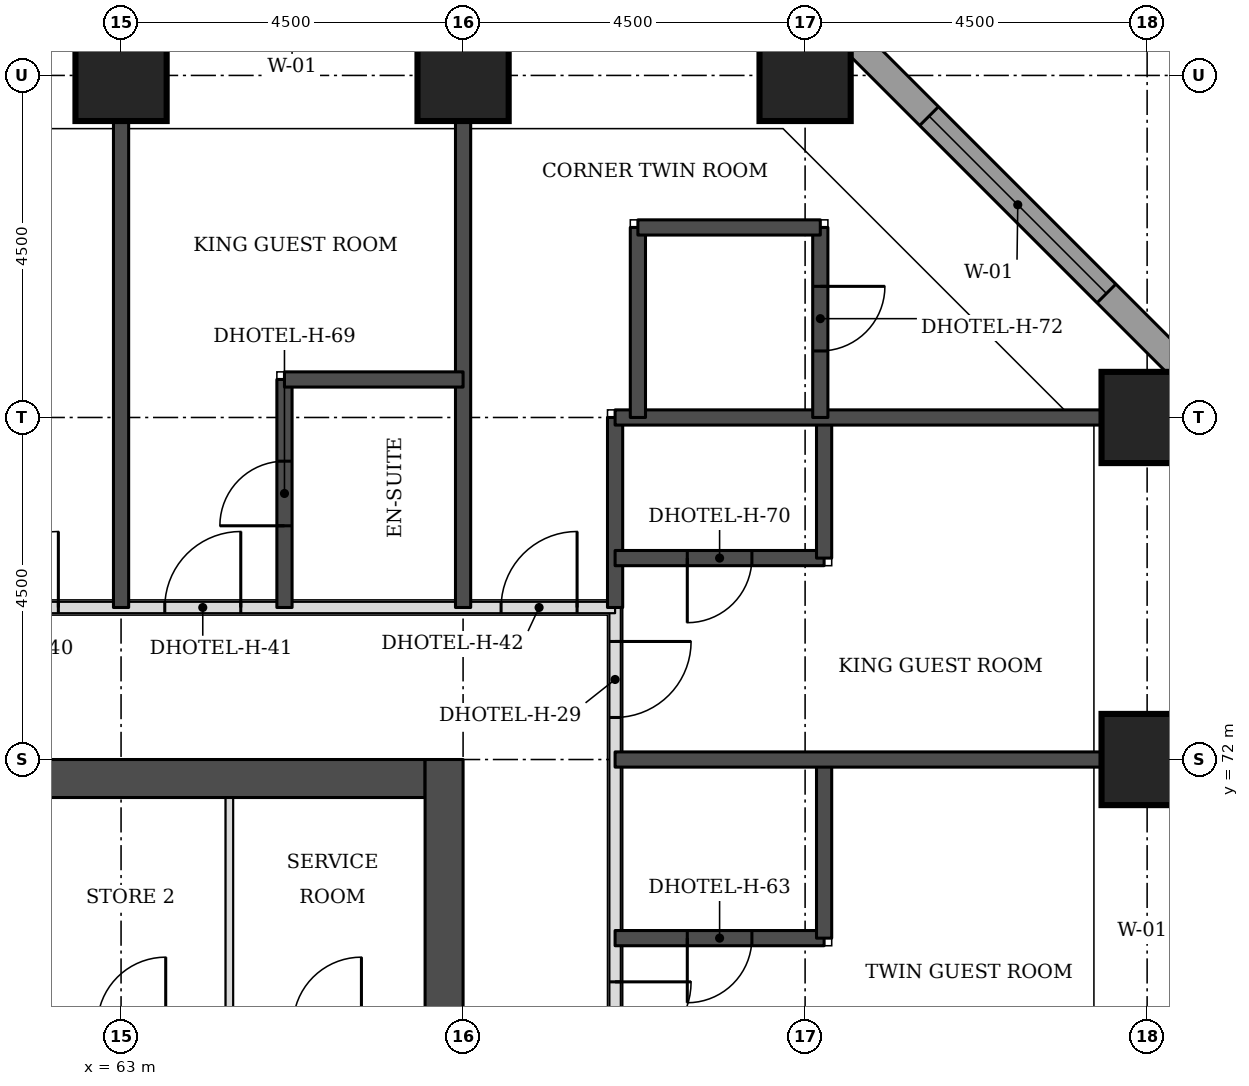
"""IFC4 building model, lengths in metres.
Left out: names, types, materials, properties, quantities, classifications, styles, units other than length and angle.
Written with IfcOpenShell. Run it as: python <this file> out.ifc"""

import sys

from ifc_helpers import new_model, si_unit, direction, frame, frame_2d, origin, origin_2d, place, context, subcontext, project, spatial, rectangle, extrude, element, fill, save


model = new_model("IFC4")
c1 = context("Model", 3, precision=1e-05, world=origin(), true_north=direction((0.0, 1.0)))
c2 = subcontext(c1, "Body", "Model", "MODEL_VIEW")
j1 = project(units=[si_unit("LENGTHUNIT", "METRE"), si_unit("PLANEANGLEUNIT", "RADIAN")], contexts=[c1])
p1 = place(None, origin())
s1 = spatial("IfcSite", under=j1, at=p1, CompositionType="ELEMENT")
p2 = place(p1, origin())
s2 = spatial("IfcBuilding", under=s1, at=p2, CompositionType="ELEMENT")
p3 = place(p2, frame((0.0, 0.0, 46.2)))
s3 = spatial("IfcBuildingStorey", under=s2, at=p3, CompositionType="ELEMENT", Elevation=46.2)
for number, where, z_axis, x_axis in (
    (1, (76.5, 72.0, 0.0), (0.0, 0.0, 1.0), (1.0, 0.0, 0.0)),
    (2, (76.5, 76.5, 0.0), (0.0, 0.0, 1.0), (1.0, 0.0, 0.0)),
    (3, (63.0, 81.0, 0.0), (0.0, 0.0, 1.0), (1.0, 0.0, 0.0)),
    (4, (67.5, 81.0, 0.0), (0.0, 0.0, 1.0), (1.0, 0.0, 0.0)),
    (5, (72.0, 81.0, 0.0), (0.0, 0.0, 1.0), (1.0, 0.0, 0.0)),
):
    element("IfcColumn", number, at=place(p3, frame(where, z_axis=z_axis, x_axis=x_axis)), inside=s3, PredefinedType="COLUMN", context=c2, shape_type="SweptSolid", body=[
        extrude(rectangle(XDim=1.2, YDim=1.2, at=origin_2d()), origin(), (0.0, 0.0, 1.0), 3.3),
    ])
p4 = place(p3, frame((45.5, 71.75, 0.0), z_axis=(0.0, 0.0, 1.0), x_axis=(1.0, 0.0, 0.0)))
e6 = element("IfcWall", 6, at=p4, inside=s3, PredefinedType="SHEAR", context=c2, shape_type="SweptSolid", body=[
    extrude(rectangle(XDim=21.5, YDim=0.5, at=frame_2d((10.75, 0.0))), origin(), (0.0, 0.0, 1.0), 3.3),
])
p5 = place(p3, frame((67.25, 49.5, 0.0), z_axis=(0.0, 0.0, 1.0), x_axis=(0.0, 1.0, 0.0)))
e7 = element("IfcWall", 7, at=p5, inside=s3, PredefinedType="SHEAR", context=c2, shape_type="SweptSolid", body=[
    extrude(rectangle(XDim=22.5, YDim=0.5, at=frame_2d((11.25, 0.0))), origin(), (0.0, 0.0, 1.0), 3.3),
])
p6 = place(p5, frame((4.2, 0.0, 0.0)))
e8 = element("IfcOpeningElement", 8, at=p6, cuts=e7, PredefinedType="OPENING", context=c2, shape_type="SweptSolid", body=[
    extrude(rectangle(XDim=1.8, YDim=2.1, at=frame_2d((0.9, 1.05))), frame((0.0, 0.26, 0.0), z_axis=(0.0, -1.0, 0.0), x_axis=(1.0, 0.0, 0.0)), (0.0, 0.0, 1.0), 0.52),
])
p7 = place(p5, frame((6.9, 0.0, 0.0)))
e9 = element("IfcOpeningElement", 9, at=p7, cuts=e7, PredefinedType="OPENING", context=c2, shape_type="SweptSolid", body=[
    extrude(rectangle(XDim=1.1, YDim=2.1, at=frame_2d((0.55, 1.05))), frame((0.0, 0.26, 0.0), z_axis=(0.0, -1.0, 0.0), x_axis=(1.0, 0.0, 0.0)), (0.0, 0.0, 1.0), 0.52),
])
p8 = place(p5, frame((13.6, 0.0, 0.0)))
e10 = element("IfcOpeningElement", 10, at=p8, cuts=e7, PredefinedType="OPENING", context=c2, shape_type="SweptSolid", body=[
    extrude(rectangle(XDim=1.1, YDim=2.1, at=frame_2d((0.55, 1.05))), frame((0.0, 0.26, 0.0), z_axis=(0.0, -1.0, 0.0), x_axis=(1.0, 0.0, 0.0)), (0.0, 0.0, 1.0), 0.52),
])
p9 = place(p5, frame((16.5, 0.0, 0.0)))
e11 = element("IfcOpeningElement", 11, at=p9, cuts=e7, PredefinedType="OPENING", context=c2, shape_type="SweptSolid", body=[
    extrude(rectangle(XDim=1.8, YDim=2.1, at=frame_2d((0.9, 1.05))), frame((0.0, 0.26, 0.0), z_axis=(0.0, -1.0, 0.0), x_axis=(1.0, 0.0, 0.0)), (0.0, 0.0, 1.0), 0.52),
])
p10 = place(p3, frame((77.326, 76.77, 0.0), z_axis=(0.0, 0.0, 1.0), x_axis=(-0.707106781187, 0.707106781187, 0.0)))
e12 = element("IfcWall", 12, at=p10, inside=s3, PredefinedType="STANDARD", context=c2, shape_type="SweptSolid", body=[
    extrude(rectangle(XDim=7.151, YDim=0.35, at=frame_2d((3.576, 0.0))), origin(), (0.0, 0.0, 1.0), 3.055),
])
p11 = place(p10, frame((1.926, 0.0, 0.8)))
e13 = element("IfcOpeningElement", 13, at=p11, cuts=e12, PredefinedType="OPENING", context=c2, shape_type="SweptSolid", body=[
    extrude(rectangle(XDim=3.3, YDim=1.5, at=frame_2d((1.65, 0.75))), frame((0.0, 0.185, 0.0), z_axis=(0.0, -1.0, 0.0), x_axis=(1.0, 0.0, 0.0)), (0.0, 0.0, 1.0), 0.37),
])
p12 = place(p3, frame((69.5, 47.5, 0.0), z_axis=(0.0, 0.0, 1.0), x_axis=(0.0, 1.0, 0.0)))
e14 = element("IfcWall", 14, at=p12, inside=s3, PredefinedType="PARTITIONING", context=c2, shape_type="SweptSolid", body=[
    extrude(rectangle(XDim=26.5, YDim=0.15, at=frame_2d((13.25, 0.0))), origin(), (0.0, 0.0, 1.0), 3.08),
])
p13 = place(p12, frame((25.053, 0.0, 0.0)))
e15 = element("IfcOpeningElement", 15, at=p13, cuts=e14, PredefinedType="OPENING", context=c2, shape_type="SweptSolid", body=[
    extrude(rectangle(XDim=1.0, YDim=2.1, at=frame_2d((0.5, 1.05))), frame((0.0, 0.085, 0.0), z_axis=(0.0, -1.0, 0.0), x_axis=(1.0, 0.0, 0.0)), (0.0, 0.0, 1.0), 0.17),
])
p14 = place(p12, frame((20.575, 0.0, 0.0)))
e16 = element("IfcOpeningElement", 16, at=p14, cuts=e14, PredefinedType="OPENING", context=c2, shape_type="SweptSolid", body=[
    extrude(rectangle(XDim=1.0, YDim=2.1, at=frame_2d((0.5, 1.05))), frame((0.0, 0.085, 0.0), z_axis=(0.0, -1.0, 0.0), x_axis=(1.0, 0.0, 0.0)), (0.0, 0.0, 1.0), 0.17),
])
p15 = place(p12, frame((18.175, 0.0, 0.0)))
e17 = element("IfcOpeningElement", 17, at=p15, cuts=e14, PredefinedType="OPENING", context=c2, shape_type="SweptSolid", body=[
    extrude(rectangle(XDim=1.0, YDim=2.1, at=frame_2d((0.5, 1.05))), frame((0.0, 0.085, 0.0), z_axis=(0.0, -1.0, 0.0), x_axis=(1.0, 0.0, 0.0)), (0.0, 0.0, 1.0), 0.17),
])
p16 = place(p12, frame((11.575, 0.0, 0.0)))
e18 = element("IfcOpeningElement", 18, at=p16, cuts=e14, PredefinedType="OPENING", context=c2, shape_type="SweptSolid", body=[
    extrude(rectangle(XDim=1.0, YDim=2.1, at=frame_2d((0.5, 1.05))), frame((0.0, 0.085, 0.0), z_axis=(0.0, -1.0, 0.0), x_axis=(1.0, 0.0, 0.0)), (0.0, 0.0, 1.0), 0.17),
])
p17 = place(p12, frame((7.65, 0.0, 0.0)))
e19 = element("IfcOpeningElement", 19, at=p17, cuts=e14, PredefinedType="OPENING", context=c2, shape_type="SweptSolid", body=[
    extrude(rectangle(XDim=1.1, YDim=2.1, at=frame_2d((0.55, 1.05))), frame((0.0, 0.085, 0.0), z_axis=(0.0, -1.0, 0.0), x_axis=(1.0, 0.0, 0.0)), (0.0, 0.0, 1.0), 0.17),
])
p18 = place(p12, frame((0.447, 0.0, 0.0)))
e20 = element("IfcOpeningElement", 20, at=p18, cuts=e14, PredefinedType="OPENING", context=c2, shape_type="SweptSolid", body=[
    extrude(rectangle(XDim=1.0, YDim=2.1, at=frame_2d((0.5, 1.05))), frame((0.0, 0.085, 0.0), z_axis=(0.0, -1.0, 0.0), x_axis=(1.0, 0.0, 0.0)), (0.0, 0.0, 1.0), 0.17),
])
p19 = place(p3, frame((43.0, 74.0, 0.0), z_axis=(0.0, 0.0, 1.0), x_axis=(1.0, 0.0, 0.0)))
e21 = element("IfcWall", 21, at=p19, inside=s3, PredefinedType="PARTITIONING", context=c2, shape_type="SweptSolid", body=[
    extrude(rectangle(XDim=26.5, YDim=0.15, at=frame_2d((13.25, 0.0))), origin(), (0.0, 0.0, 1.0), 3.08),
])
p20 = place(p19, frame((2.575, 0.0, 0.0)))
e22 = element("IfcOpeningElement", 22, at=p20, cuts=e21, PredefinedType="OPENING", context=c2, shape_type="SweptSolid", body=[
    extrude(rectangle(XDim=1.0, YDim=2.1, at=frame_2d((0.5, 1.05))), frame((0.0, 0.085, 0.0), z_axis=(0.0, -1.0, 0.0), x_axis=(1.0, 0.0, 0.0)), (0.0, 0.0, 1.0), 0.17),
])
p21 = place(p19, frame((9.175, 0.0, 0.0)))
e23 = element("IfcOpeningElement", 23, at=p21, cuts=e21, PredefinedType="OPENING", context=c2, shape_type="SweptSolid", body=[
    extrude(rectangle(XDim=1.0, YDim=2.1, at=frame_2d((0.5, 1.05))), frame((0.0, 0.085, 0.0), z_axis=(0.0, -1.0, 0.0), x_axis=(1.0, 0.0, 0.0)), (0.0, 0.0, 1.0), 0.17),
])
p22 = place(p19, frame((11.575, 0.0, 0.0)))
e24 = element("IfcOpeningElement", 24, at=p22, cuts=e21, PredefinedType="OPENING", context=c2, shape_type="SweptSolid", body=[
    extrude(rectangle(XDim=1.0, YDim=2.1, at=frame_2d((0.5, 1.05))), frame((0.0, 0.085, 0.0), z_axis=(0.0, -1.0, 0.0), x_axis=(1.0, 0.0, 0.0)), (0.0, 0.0, 1.0), 0.17),
])
p23 = place(p19, frame((18.175, 0.0, 0.0)))
e25 = element("IfcOpeningElement", 25, at=p23, cuts=e21, PredefinedType="OPENING", context=c2, shape_type="SweptSolid", body=[
    extrude(rectangle(XDim=1.0, YDim=2.1, at=frame_2d((0.5, 1.05))), frame((0.0, 0.085, 0.0), z_axis=(0.0, -1.0, 0.0), x_axis=(1.0, 0.0, 0.0)), (0.0, 0.0, 1.0), 0.17),
])
p24 = place(p19, frame((20.575, 0.0, 0.0)))
e26 = element("IfcOpeningElement", 26, at=p24, cuts=e21, PredefinedType="OPENING", context=c2, shape_type="SweptSolid", body=[
    extrude(rectangle(XDim=1.0, YDim=2.1, at=frame_2d((0.5, 1.05))), frame((0.0, 0.085, 0.0), z_axis=(0.0, -1.0, 0.0), x_axis=(1.0, 0.0, 0.0)), (0.0, 0.0, 1.0), 0.17),
])
p25 = place(p19, frame((0.5, 0.0, 0.0)))
e27 = element("IfcOpeningElement", 27, at=p25, cuts=e21, PredefinedType="OPENING", context=c2, shape_type="SweptSolid", body=[
    extrude(rectangle(XDim=1.0, YDim=2.1, at=frame_2d((0.5, 1.05))), frame((0.0, 0.085, 0.0), z_axis=(0.0, -1.0, 0.0), x_axis=(1.0, 0.0, 0.0)), (0.0, 0.0, 1.0), 0.17),
])
p26 = place(p19, frame((25.0, 0.0, 0.0)))
e28 = element("IfcOpeningElement", 28, at=p26, cuts=e21, PredefinedType="OPENING", context=c2, shape_type="SweptSolid", body=[
    extrude(rectangle(XDim=1.0, YDim=2.1, at=frame_2d((0.5, 1.05))), frame((0.0, 0.085, 0.0), z_axis=(0.0, -1.0, 0.0), x_axis=(1.0, 0.0, 0.0)), (0.0, 0.0, 1.0), 0.17),
])
p27 = place(p3, frame((69.5, 69.65, 0.0), z_axis=(0.0, 0.0, 1.0), x_axis=(1.0, 0.0, 0.0)))
e29 = element("IfcWall", 29, at=p27, inside=s3, PredefinedType="SOLIDWALL", context=c2, shape_type="SweptSolid", body=[
    extrude(rectangle(XDim=2.75, YDim=0.2, at=frame_2d((1.375, 0.0))), origin(), (0.0, 0.0, 1.0), 3.08),
])
p28 = place(p27, frame((0.95, 0.0, 0.0)))
e30 = element("IfcOpeningElement", 30, at=p28, cuts=e29, PredefinedType="OPENING", context=c2, shape_type="SweptSolid", body=[
    extrude(rectangle(XDim=0.85, YDim=2.1, at=frame_2d((0.425, 1.05))), frame((0.0, 0.11, 0.0), z_axis=(0.0, -1.0, 0.0), x_axis=(1.0, 0.0, 0.0)), (0.0, 0.0, 1.0), 0.22),
])
p29 = place(p3, frame((72.25, 69.65, 0.0), z_axis=(0.0, 0.0, 1.0), x_axis=(0.0, 1.0, 0.0)))
e31 = element("IfcWall", 31, at=p29, inside=s3, PredefinedType="SOLIDWALL", context=c2, shape_type="SweptSolid", body=[
    extrude(rectangle(XDim=2.35, YDim=0.2, at=frame_2d((1.175, 0.0))), origin(), (0.0, 0.0, 1.0), 3.08),
])
for number, where, z_axis, x_axis in (
    (32, (69.5, 72.0, 0.0), (0.0, 0.0, 1.0), (1.0, 0.0, 0.0)),
    (33, (63.0, 74.0, 0.0), (0.0, 0.0, 1.0), (0.0, 1.0, 0.0)),
):
    element("IfcWall", number, at=place(p3, frame(where, z_axis=z_axis, x_axis=x_axis)), inside=s3, PredefinedType="SOLIDWALL", context=c2, shape_type="SweptSolid", body=[
        extrude(rectangle(XDim=6.4, YDim=0.2, at=frame_2d((3.2, 0.0))), origin(), (0.0, 0.0, 1.0), 3.08),
    ])
p30 = place(p3, frame((65.15, 74.0, 0.0), z_axis=(0.0, 0.0, 1.0), x_axis=(0.0, 1.0, 0.0)))
e34 = element("IfcWall", 34, at=p30, inside=s3, PredefinedType="SOLIDWALL", context=c2, shape_type="SweptSolid", body=[
    extrude(rectangle(XDim=3.0, YDim=0.2, at=frame_2d((1.5, 0.0))), origin(), (0.0, 0.0, 1.0), 3.08),
])
p31 = place(p30, frame((1.075, 0.0, 0.0)))
e35 = element("IfcOpeningElement", 35, at=p31, cuts=e34, PredefinedType="OPENING", context=c2, shape_type="SweptSolid", body=[
    extrude(rectangle(XDim=0.85, YDim=2.1, at=frame_2d((0.425, 1.05))), frame((0.0, 0.11, 0.0), z_axis=(0.0, -1.0, 0.0), x_axis=(1.0, 0.0, 0.0)), (0.0, 0.0, 1.0), 0.22),
])
p32 = place(p3, frame((67.5, 74.0, 0.0), z_axis=(0.0, 0.0, 1.0), x_axis=(0.0, 1.0, 0.0)))
e36 = element("IfcWall", 36, at=p32, inside=s3, PredefinedType="SOLIDWALL", context=c2, shape_type="SweptSolid", body=[
    extrude(rectangle(XDim=6.4, YDim=0.2, at=frame_2d((3.2, 0.0))), origin(), (0.0, 0.0, 1.0), 3.08),
])
p33 = place(p3, frame((69.5, 74.0, 0.0), z_axis=(0.0, 0.0, 1.0), x_axis=(0.0, 1.0, 0.0)))
e37 = element("IfcWall", 37, at=p33, inside=s3, PredefinedType="SOLIDWALL", context=c2, shape_type="SweptSolid", body=[
    extrude(rectangle(XDim=2.5, YDim=0.2, at=frame_2d((1.25, 0.0))), origin(), (0.0, 0.0, 1.0), 3.08),
])
p34 = place(p3, frame((69.5, 74.65, 0.0), z_axis=(0.0, 0.0, 1.0), x_axis=(1.0, 0.0, 0.0)))
e38 = element("IfcWall", 38, at=p34, inside=s3, PredefinedType="SOLIDWALL", context=c2, shape_type="SweptSolid", body=[
    extrude(rectangle(XDim=2.75, YDim=0.2, at=frame_2d((1.375, 0.0))), origin(), (0.0, 0.0, 1.0), 3.08),
])
p35 = place(p34, frame((0.95, 0.0, 0.0)))
e39 = element("IfcOpeningElement", 39, at=p35, cuts=e38, PredefinedType="OPENING", context=c2, shape_type="SweptSolid", body=[
    extrude(rectangle(XDim=0.85, YDim=2.1, at=frame_2d((0.425, 1.05))), frame((0.0, 0.11, 0.0), z_axis=(0.0, -1.0, 0.0), x_axis=(1.0, 0.0, 0.0)), (0.0, 0.0, 1.0), 0.22),
])
p36 = place(p3, frame((72.25, 74.65, 0.0), z_axis=(0.0, 0.0, 1.0), x_axis=(0.0, 1.0, 0.0)))
e40 = element("IfcWall", 40, at=p36, inside=s3, PredefinedType="SOLIDWALL", context=c2, shape_type="SweptSolid", body=[
    extrude(rectangle(XDim=1.85, YDim=0.2, at=frame_2d((0.925, 0.0))), origin(), (0.0, 0.0, 1.0), 3.08),
])
p37 = place(p3, frame((69.5, 76.5, 0.0), z_axis=(0.0, 0.0, 1.0), x_axis=(1.0, 0.0, 0.0)))
e41 = element("IfcWall", 41, at=p37, inside=s3, PredefinedType="SOLIDWALL", context=c2, shape_type="SweptSolid", body=[
    extrude(rectangle(XDim=6.4, YDim=0.2, at=frame_2d((3.2, 0.0))), origin(), (0.0, 0.0, 1.0), 3.08),
])
p38 = place(p3, frame((69.8, 76.5, 0.0), z_axis=(0.0, 0.0, 1.0), x_axis=(0.0, 1.0, 0.0)))
e42 = element("IfcWall", 42, at=p38, inside=s3, PredefinedType="SOLIDWALL", context=c2, shape_type="SweptSolid", body=[
    extrude(rectangle(XDim=2.5, YDim=0.2, at=frame_2d((1.25, 0.0))), origin(), (0.0, 0.0, 1.0), 3.08),
])
p39 = place(p3, frame((72.2, 76.5, 0.0), z_axis=(0.0, 0.0, 1.0), x_axis=(0.0, 1.0, 0.0)))
e43 = element("IfcWall", 43, at=p39, inside=s3, PredefinedType="SOLIDWALL", context=c2, shape_type="SweptSolid", body=[
    extrude(rectangle(XDim=2.5, YDim=0.2, at=frame_2d((1.25, 0.0))), origin(), (0.0, 0.0, 1.0), 3.08),
])
p40 = place(p39, frame((0.875, 0.0, 0.0)))
e44 = element("IfcOpeningElement", 44, at=p40, cuts=e43, PredefinedType="OPENING", context=c2, shape_type="SweptSolid", body=[
    extrude(rectangle(XDim=0.85, YDim=2.1, at=frame_2d((0.425, 1.05))), frame((0.0, 0.11, 0.0), z_axis=(0.0, -1.0, 0.0), x_axis=(1.0, 0.0, 0.0)), (0.0, 0.0, 1.0), 0.22),
])
p41 = place(p3, frame((65.15, 77.0, 0.0), z_axis=(0.0, 0.0, 1.0), x_axis=(1.0, 0.0, 0.0)))
e45 = element("IfcWall", 45, at=p41, inside=s3, PredefinedType="SOLIDWALL", context=c2, shape_type="SweptSolid", body=[
    extrude(rectangle(XDim=2.35, YDim=0.2, at=frame_2d((1.175, 0.0))), origin(), (0.0, 0.0, 1.0), 3.08),
])
p42 = place(p3, frame((69.8, 79.0, 0.0), z_axis=(0.0, 0.0, 1.0), x_axis=(1.0, 0.0, 0.0)))
e46 = element("IfcWall", 46, at=p42, inside=s3, PredefinedType="SOLIDWALL", context=c2, shape_type="SweptSolid", body=[
    extrude(rectangle(XDim=2.4, YDim=0.2, at=frame_2d((1.2, 0.0))), origin(), (0.0, 0.0, 1.0), 3.08),
])
p43 = place(p3, frame((64.425, 68.5, 0.0), z_axis=(0.0, 0.0, 1.0), x_axis=(0.0, 1.0, 0.0)))
e47 = element("IfcWall", 47, at=p43, inside=s3, PredefinedType="PARTITIONING", context=c2, shape_type="SweptSolid", body=[
    extrude(rectangle(XDim=3.0, YDim=0.1, at=frame_2d((1.5, 0.0))), origin(), (0.0, 0.0, 1.0), 3.08),
])
p44 = place(p11, origin())
e48 = element("IfcWindow", 48, at=p44, inside=s3, PartitioningType="SINGLE_PANEL", PredefinedType="WINDOW", context=c2, shape_type="SweptSolid", body=[
    extrude(rectangle(XDim=3.3, YDim=1.5, at=frame_2d((1.65, 0.75))), frame((0.0, 0.085, 0.0), z_axis=(0.0, -1.0, 0.0), x_axis=(1.0, 0.0, 0.0)), (0.0, 0.0, 1.0), 0.06),
])
fill(e13, e48)
p45 = place(p23, origin())
e49 = element("IfcDoor", 49, at=p45, inside=s3, OperationType="SINGLE_SWING_RIGHT", PredefinedType="DOOR", context=c2, shape_type="SweptSolid", body=[
    extrude(rectangle(XDim=1.0, YDim=2.1, at=frame_2d((0.5, 1.05))), frame((0.0, 0.025, 0.0), z_axis=(0.0, -1.0, 0.0), x_axis=(1.0, 0.0, 0.0)), (0.0, 0.0, 1.0), 0.05),
])
fill(e25, e49)
p46 = place(p24, origin())
e50 = element("IfcDoor", 50, at=p46, inside=s3, OperationType="SINGLE_SWING_RIGHT", PredefinedType="DOOR", context=c2, shape_type="SweptSolid", body=[
    extrude(rectangle(XDim=1.0, YDim=2.1, at=frame_2d((0.5, 1.05))), frame((0.0, 0.025, 0.0), z_axis=(0.0, -1.0, 0.0), x_axis=(1.0, 0.0, 0.0)), (0.0, 0.0, 1.0), 0.05),
])
fill(e26, e50)
p47 = place(p31, origin())
e51 = element("IfcDoor", 51, at=p47, inside=s3, OperationType="SINGLE_SWING_LEFT", PredefinedType="DOOR", context=c2, shape_type="SweptSolid", body=[
    extrude(rectangle(XDim=0.85, YDim=2.1, at=frame_2d((0.425, 1.05))), frame((0.0, 0.025, 0.0), z_axis=(0.0, -1.0, 0.0), x_axis=(1.0, 0.0, 0.0)), (0.0, 0.0, 1.0), 0.05),
])
fill(e35, e51)
p48 = place(p13, frame((1.0, 0.0, 0.0), z_axis=(0.0, 0.0, 1.0), x_axis=(-1.0, 0.0, 0.0)))
e52 = element("IfcDoor", 52, at=p48, inside=s3, OperationType="SINGLE_SWING_LEFT", PredefinedType="DOOR", context=c2, shape_type="SweptSolid", body=[
    extrude(rectangle(XDim=1.0, YDim=2.1, at=frame_2d((0.5, 1.05))), frame((0.0, 0.025, 0.0), z_axis=(0.0, -1.0, 0.0), x_axis=(1.0, 0.0, 0.0)), (0.0, 0.0, 1.0), 0.05),
])
fill(e15, e52)
p49 = place(p35, frame((0.85, 0.0, 0.0), z_axis=(0.0, 0.0, 1.0), x_axis=(-1.0, 0.0, 0.0)))
e53 = element("IfcDoor", 53, at=p49, inside=s3, OperationType="SINGLE_SWING_RIGHT", PredefinedType="DOOR", context=c2, shape_type="SweptSolid", body=[
    extrude(rectangle(XDim=0.85, YDim=2.1, at=frame_2d((0.425, 1.05))), frame((0.0, 0.025, 0.0), z_axis=(0.0, -1.0, 0.0), x_axis=(1.0, 0.0, 0.0)), (0.0, 0.0, 1.0), 0.05),
])
fill(e39, e53)
p50 = place(p14, frame((1.0, 0.0, 0.0), z_axis=(0.0, 0.0, 1.0), x_axis=(-1.0, 0.0, 0.0)))
e54 = element("IfcDoor", 54, at=p50, inside=s3, OperationType="SINGLE_SWING_LEFT", PredefinedType="DOOR", context=c2, shape_type="SweptSolid", body=[
    extrude(rectangle(XDim=1.0, YDim=2.1, at=frame_2d((0.5, 1.05))), frame((0.0, 0.025, 0.0), z_axis=(0.0, -1.0, 0.0), x_axis=(1.0, 0.0, 0.0)), (0.0, 0.0, 1.0), 0.05),
])
fill(e16, e54)
p51 = place(p28, frame((0.85, 0.0, 0.0), z_axis=(0.0, 0.0, 1.0), x_axis=(-1.0, 0.0, 0.0)))
e55 = element("IfcDoor", 55, at=p51, inside=s3, OperationType="SINGLE_SWING_RIGHT", PredefinedType="DOOR", context=c2, shape_type="SweptSolid", body=[
    extrude(rectangle(XDim=0.85, YDim=2.1, at=frame_2d((0.425, 1.05))), frame((0.0, 0.025, 0.0), z_axis=(0.0, -1.0, 0.0), x_axis=(1.0, 0.0, 0.0)), (0.0, 0.0, 1.0), 0.05),
])
fill(e30, e55)
p52 = place(p26, origin())
e56 = element("IfcDoor", 56, at=p52, inside=s3, OperationType="SINGLE_SWING_RIGHT", PredefinedType="DOOR", context=c2, shape_type="SweptSolid", body=[
    extrude(rectangle(XDim=1.0, YDim=2.1, at=frame_2d((0.5, 1.05))), frame((0.0, 0.025, 0.0), z_axis=(0.0, -1.0, 0.0), x_axis=(1.0, 0.0, 0.0)), (0.0, 0.0, 1.0), 0.05),
])
fill(e28, e56)
p53 = place(p40, frame((0.85, 0.0, 0.0), z_axis=(0.0, 0.0, 1.0), x_axis=(-1.0, 0.0, 0.0)))
e57 = element("IfcDoor", 57, at=p53, inside=s3, OperationType="SINGLE_SWING_LEFT", PredefinedType="DOOR", context=c2, shape_type="SweptSolid", body=[
    extrude(rectangle(XDim=0.85, YDim=2.1, at=frame_2d((0.425, 1.05))), frame((0.0, 0.025, 0.0), z_axis=(0.0, -1.0, 0.0), x_axis=(1.0, 0.0, 0.0)), (0.0, 0.0, 1.0), 0.05),
])
fill(e44, e57)
save(model, sys.argv[1])
